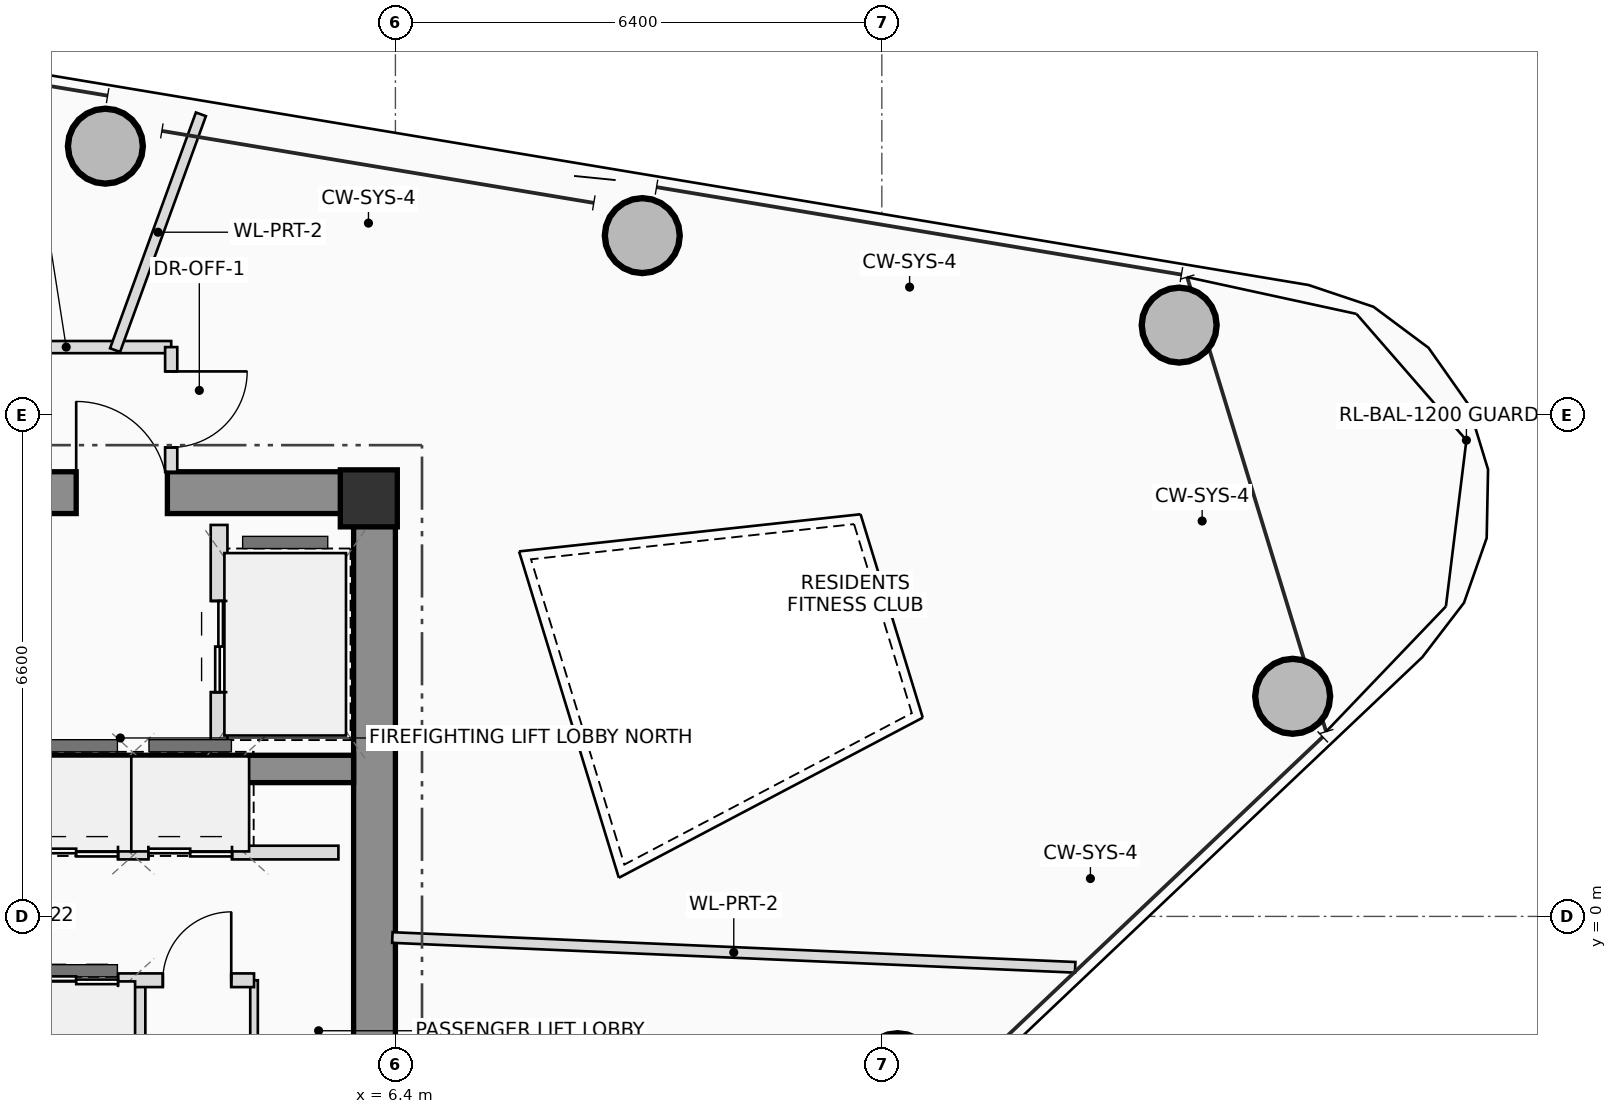
"""IFC4 building model, lengths in metres.
Left out: names, types, materials, properties, quantities, classifications, styles, units other than length and angle.
Written with IfcOpenShell. Run it as: python <this file> out.ifc"""

import sys

from ifc_helpers import new_model, si_unit, direction, frame, frame_2d, origin, origin_2d, place, context, subcontext, project, spatial, rectangle, hollow_circle, extrude, source, transform, mapped, element, fill, save


model = new_model("IFC4")
c1 = context("Model", 3, precision=1e-05, world=origin(), true_north=direction((0.0, 1.0)))
c2 = subcontext(c1, "Body", "Model", "MODEL_VIEW")
j1 = project(units=[si_unit("LENGTHUNIT", "METRE"), si_unit("PLANEANGLEUNIT", "RADIAN")], contexts=[c1])
p1 = place(None, origin())
s1 = spatial("IfcSite", under=j1, at=p1, CompositionType="ELEMENT")
p2 = place(p1, origin())
s2 = spatial("IfcBuilding", under=s1, at=p2, CompositionType="ELEMENT")
p3 = place(p2, frame((0.0, 0.0, 232.05)))
s3 = spatial("IfcBuildingStorey", under=s2, at=p3, CompositionType="ELEMENT", Elevation=232.05)
m1 = source(origin(), c2, "Body", "SweptSolid", [
    extrude(rectangle(XDim=0.75, YDim=0.75, at=origin_2d()), origin(), (0.0, 0.0, 1.0), 3.4),
])
p4 = place(p3, frame((6.05, 5.5, 0.0), z_axis=(0.0, 0.0, 1.0), x_axis=(1.0, 0.0, 0.0)))
e1 = element("IfcColumn", 1, at=p4, inside=s3, PredefinedType="COLUMN", context=c2, shape_type="MappedRepresentation", body=[
    mapped(m1, transform((0.0, 0.0, 0.0), scale=1.0)),
])
p5 = place(p3, frame((-6.4, 5.575, 0.0), z_axis=(0.0, 0.0, 1.0), x_axis=(1.0, 0.0, 0.0)))
e2 = element("IfcWall", 2, at=p5, inside=s3, PredefinedType="SHEAR", context=c2, shape_type="SweptSolid", body=[
    extrude(rectangle(XDim=12.8, YDim=0.55, at=frame_2d((6.4, 0.0))), origin(), (0.0, 0.0, 1.0), 3.4),
])
p6 = place(p5, frame((8.6, 0.0, 0.0)))
e3 = element("IfcOpeningElement", 3, at=p6, cuts=e2, PredefinedType="OPENING", context=c2, shape_type="SweptSolid", body=[
    extrude(rectangle(XDim=1.2, YDim=2.2, at=frame_2d((0.6, 1.1))), frame((0.0, 0.285, 0.0), z_axis=(0.0, -1.0, 0.0), x_axis=(1.0, 0.0, 0.0)), (0.0, 0.0, 1.0), 0.57),
])
p7 = place(p3, frame((6.125, -5.3, 0.0), z_axis=(0.0, 0.0, 1.0), x_axis=(0.0, 1.0, 0.0)))
e4 = element("IfcWall", 4, at=p7, inside=s3, PredefinedType="SHEAR", context=c2, shape_type="SweptSolid", body=[
    extrude(rectangle(XDim=10.6, YDim=0.55, at=frame_2d((5.3, 0.0))), origin(), (0.0, 0.0, 1.0), 3.4),
])
p8 = place(p3, frame((-5.85, 1.94, 0.0), z_axis=(0.0, 0.0, 1.0), x_axis=(1.0, 0.0, 0.0)))
e5 = element("IfcWall", 5, at=p8, inside=s3, PredefinedType="SHEAR", context=c2, shape_type="SweptSolid", body=[
    extrude(rectangle(XDim=11.7, YDim=0.36, at=frame_2d((5.85, 0.0))), origin(), (0.0, 0.0, 1.0), 3.4),
])
m2 = source(origin(), c2, "Body", "SweptSolid", [
    extrude(hollow_circle(Radius=0.5, WallThickness=0.04, at=origin_2d()), origin(), (0.0, 0.0, 1.0), 3.4),
])
for number, where, z_axis, x_axis in (
    (6, (13.007, -2.03, 0.0), (0.0, 0.0, 1.0), (1.0, 0.0, 0.0)),
    (7, (18.205, 2.896, 0.0), (0.0, 0.0, 1.0), (1.0, 0.0, 0.0)),
    (8, (16.712, 7.779, 0.0), (0.0, 0.0, 1.0), (1.0, 0.0, 0.0)),
    (9, (9.648, 8.957, 0.0), (0.0, 0.0, 1.0), (1.0, 0.0, 0.0)),
    (10, (2.584, 10.134, 0.0), (0.0, 0.0, 1.0), (1.0, 0.0, 0.0)),
):
    element("IfcColumn", number, at=place(p3, frame(where, z_axis=z_axis, x_axis=x_axis)), inside=s3, PredefinedType="COLUMN", context=c2, shape_type="MappedRepresentation", body=[
        mapped(m2, transform((0.0, 0.0, 0.0), scale=1.0)),
    ])
p9 = place(p3, frame((4.08, 2.2, 0.0), z_axis=(0.0, 0.0, 1.0), x_axis=(0.0, 1.0, 0.0)))
e11 = element("IfcWall", 11, at=p9, inside=s3, PredefinedType="PLUMBINGWALL", context=c2, shape_type="SweptSolid", body=[
    extrude(rectangle(XDim=2.95, YDim=0.22, at=frame_2d((1.475, 0.0))), origin(), (0.0, 0.0, 1.0), 3.2),
])
p10 = place(p9, frame((0.75, 0.0, 0.0)))
e12 = element("IfcOpeningElement", 12, at=p10, cuts=e11, PredefinedType="OPENING", context=c2, shape_type="SweptSolid", body=[
    extrude(rectangle(XDim=1.2, YDim=2.25, at=frame_2d((0.6, 1.125))), frame((0.0, 0.12, 0.0), z_axis=(0.0, -1.0, 0.0), x_axis=(1.0, 0.0, 0.0)), (0.0, 0.0, 1.0), 0.24),
])
for number, where, z_axis, x_axis in (
    (13, (3.02, 0.84, 0.0), (0.0, 0.0, 1.0), (0.0, 1.0, 0.0)),
    (14, (4.38, 0.84, 0.0), (0.0, 0.0, 1.0), (0.0, 1.0, 0.0)),
    (15, (3.02, -1.82, 0.0), (0.0, 0.0, 1.0), (0.0, 1.0, 0.0)),
):
    element("IfcWall", number, at=place(p3, frame(where, z_axis=z_axis, x_axis=x_axis)), inside=s3, PredefinedType="PLUMBINGWALL", context=c2, shape_type="SweptSolid", body=[
        extrude(rectangle(XDim=0.98, YDim=0.18, at=frame_2d((0.49, 0.0))), origin(), (0.0, 0.0, 1.0), 3.2),
    ])
p11 = place(p3, frame((4.54, -1.82, 0.0), z_axis=(0.0, 0.0, 1.0), x_axis=(0.0, 1.0, 0.0)))
e16 = element("IfcWall", 16, at=p11, inside=s3, PredefinedType="PARTITIONING", context=c2, shape_type="SweptSolid", body=[
    extrude(rectangle(XDim=0.98, YDim=0.1, at=frame_2d((0.49, 0.0))), origin(), (0.0, 0.0, 1.0), 3.2),
])
p12 = place(p3, frame((-5.68, 0.84, 0.0), z_axis=(0.0, 0.0, 1.0), x_axis=(1.0, 0.0, 0.0)))
e17 = element("IfcWall", 17, at=p12, inside=s3, PredefinedType="PLUMBINGWALL", context=c2, shape_type="SweptSolid", body=[
    extrude(rectangle(XDim=11.33, YDim=0.18, at=frame_2d((5.665, 0.0))), origin(), (0.0, 0.0, 1.0), 3.2),
])
p13 = place(p12, frame((3.13, 0.0, 0.0)))
e18 = element("IfcOpeningElement", 18, at=p13, cuts=e17, PredefinedType="OPENING", context=c2, shape_type="SweptSolid", body=[
    extrude(rectangle(XDim=0.9, YDim=2.05, at=frame_2d((0.45, 1.025))), frame((0.0, 0.1, 0.0), z_axis=(0.0, -1.0, 0.0), x_axis=(1.0, 0.0, 0.0)), (0.0, 0.0, 1.0), 0.2),
])
p14 = place(p12, frame((7.33, 0.0, 0.0)))
e19 = element("IfcOpeningElement", 19, at=p14, cuts=e17, PredefinedType="OPENING", context=c2, shape_type="SweptSolid", body=[
    extrude(rectangle(XDim=1.1, YDim=2.2, at=frame_2d((0.55, 1.1))), frame((0.0, 0.1, 0.0), z_axis=(0.0, -1.0, 0.0), x_axis=(1.0, 0.0, 0.0)), (0.0, 0.0, 1.0), 0.2),
])
p15 = place(p12, frame((8.83, 0.0, 0.0)))
e20 = element("IfcOpeningElement", 20, at=p15, cuts=e17, PredefinedType="OPENING", context=c2, shape_type="SweptSolid", body=[
    extrude(rectangle(XDim=1.1, YDim=2.2, at=frame_2d((0.55, 1.1))), frame((0.0, 0.1, 0.0), z_axis=(0.0, -1.0, 0.0), x_axis=(1.0, 0.0, 0.0)), (0.0, 0.0, 1.0), 0.2),
])
p16 = place(p3, frame((-5.68, -0.84, 0.0), z_axis=(0.0, 0.0, 1.0), x_axis=(1.0, 0.0, 0.0)))
e21 = element("IfcWall", 21, at=p16, inside=s3, PredefinedType="PLUMBINGWALL", context=c2, shape_type="SweptSolid", body=[
    extrude(rectangle(XDim=10.22, YDim=0.18, at=frame_2d((5.11, 0.0))), origin(), (0.0, 0.0, 1.0), 3.2),
])
p17 = place(p16, frame((1.88, 0.0, 0.0)))
e22 = element("IfcOpeningElement", 22, at=p17, cuts=e21, PredefinedType="OPENING", context=c2, shape_type="SweptSolid", body=[
    extrude(rectangle(XDim=0.9, YDim=2.05, at=frame_2d((0.45, 1.025))), frame((0.0, 0.1, 0.0), z_axis=(0.0, -1.0, 0.0), x_axis=(1.0, 0.0, 0.0)), (0.0, 0.0, 1.0), 0.2),
])
p18 = place(p16, frame((5.35, 0.0, 0.0)))
e23 = element("IfcOpeningElement", 23, at=p18, cuts=e21, PredefinedType="OPENING", context=c2, shape_type="SweptSolid", body=[
    extrude(rectangle(XDim=0.9, YDim=2.05, at=frame_2d((0.45, 1.025))), frame((0.0, 0.1, 0.0), z_axis=(0.0, -1.0, 0.0), x_axis=(1.0, 0.0, 0.0)), (0.0, 0.0, 1.0), 0.2),
])
p19 = place(p16, frame((7.33, 0.0, 0.0)))
e24 = element("IfcOpeningElement", 24, at=p19, cuts=e21, PredefinedType="OPENING", context=c2, shape_type="SweptSolid", body=[
    extrude(rectangle(XDim=1.1, YDim=2.2, at=frame_2d((0.55, 1.1))), frame((0.0, 0.1, 0.0), z_axis=(0.0, -1.0, 0.0), x_axis=(1.0, 0.0, 0.0)), (0.0, 0.0, 1.0), 0.2),
])
p20 = place(p16, frame((9.02, 0.0, 0.0)))
e25 = element("IfcOpeningElement", 25, at=p20, cuts=e21, PredefinedType="OPENING", context=c2, shape_type="SweptSolid", body=[
    extrude(rectangle(XDim=0.9, YDim=2.05, at=frame_2d((0.45, 1.025))), frame((0.0, 0.1, 0.0), z_axis=(0.0, -1.0, 0.0), x_axis=(1.0, 0.0, 0.0)), (0.0, 0.0, 1.0), 0.2),
])
p21 = place(p3, frame((-6.36, 7.49, 0.0), z_axis=(0.0, 0.0, 1.0), x_axis=(1.0, 0.0, 0.0)))
e26 = element("IfcWall", 26, at=p21, inside=s3, PredefinedType="PARTITIONING", context=c2, shape_type="SweptSolid", body=[
    extrude(rectangle(XDim=9.81, YDim=0.16, at=frame_2d((4.905, 0.0))), origin(), (0.0, 0.0, 1.0), 2.605),
])
p22 = place(p21, frame((1.867, 0.0, 0.0)))
e27 = element("IfcOpeningElement", 27, at=p22, cuts=e26, PredefinedType="OPENING", context=c2, shape_type="SweptSolid", body=[
    extrude(rectangle(XDim=1.0, YDim=2.25, at=frame_2d((0.5, 1.125))), frame((0.0, 0.09, 0.0), z_axis=(0.0, -1.0, 0.0), x_axis=(1.0, 0.0, 0.0)), (0.0, 0.0, 1.0), 0.18),
])
p23 = place(p21, frame((5.897, 0.0, 0.0)))
e28 = element("IfcOpeningElement", 28, at=p23, cuts=e26, PredefinedType="OPENING", context=c2, shape_type="SweptSolid", body=[
    extrude(rectangle(XDim=1.0, YDim=2.25, at=frame_2d((0.5, 1.125))), frame((0.0, 0.09, 0.0), z_axis=(0.0, -1.0, 0.0), x_axis=(1.0, 0.0, 0.0)), (0.0, 0.0, 1.0), 0.18),
])
p24 = place(p3, frame((3.45, 7.49, 0.0), z_axis=(0.0, 0.0, 1.0), x_axis=(0.0, -1.0, 0.0)))
e29 = element("IfcWall", 29, at=p24, inside=s3, PredefinedType="PARTITIONING", context=c2, shape_type="SweptSolid", body=[
    extrude(rectangle(XDim=1.64, YDim=0.16, at=frame_2d((0.82, 0.0))), origin(), (0.0, 0.0, 1.0), 3.2),
])
p25 = place(p24, frame((0.32, 0.0, 0.0)))
e30 = element("IfcOpeningElement", 30, at=p25, cuts=e29, PredefinedType="OPENING", context=c2, shape_type="SweptSolid", body=[
    extrude(rectangle(XDim=1.0, YDim=2.25, at=frame_2d((0.5, 1.125))), frame((0.0, 0.09, 0.0), z_axis=(0.0, -1.0, 0.0), x_axis=(1.0, 0.0, 0.0)), (0.0, 0.0, 1.0), 0.18),
])
p26 = place(p3, frame((6.36, -0.278, 0.0), z_axis=(0.0, 0.0, 1.0), x_axis=(0.99904773846, -0.043630451279, 0.0)))
e31 = element("IfcWall", 31, at=p26, inside=s3, PredefinedType="PARTITIONING", context=c2, shape_type="SweptSolid", body=[
    extrude(rectangle(XDim=8.992, YDim=0.14, at=frame_2d((4.496, 0.0))), origin(), (0.0, 0.0, 1.0), 2.605),
])
p27 = place(p3, frame((2.712, 7.45, 0.0), z_axis=(0.0, 0.0, 1.0), x_axis=(0.341974588874, 0.9397092, 0.0)))
e32 = element("IfcWall", 32, at=p27, inside=s3, PredefinedType="PARTITIONING", context=c2, shape_type="SweptSolid", body=[
    extrude(rectangle(XDim=3.302, YDim=0.14, at=frame_2d((1.651, 0.0))), origin(), (0.0, 0.0, 1.0), 2.605),
])
p28 = place(p6, origin())
e33 = element("IfcDoor", 33, at=p28, inside=s3, OperationType="SINGLE_SWING_LEFT", PredefinedType="DOOR", context=c2, shape_type="SweptSolid", body=[
    extrude(rectangle(XDim=1.2, YDim=2.2, at=frame_2d((0.6, 1.1))), frame((0.0, 0.025, 0.0), z_axis=(0.0, -1.0, 0.0), x_axis=(1.0, 0.0, 0.0)), (0.0, 0.0, 1.0), 0.05),
])
fill(e3, e33)
p29 = place(p10, origin())
e34 = element("IfcDoor", 34, at=p29, inside=s3, OperationType="DOUBLE_DOOR_SLIDING", PredefinedType="DOOR", context=c2, shape_type="SweptSolid", body=[
    extrude(rectangle(XDim=1.2, YDim=2.25, at=frame_2d((0.6, 1.125))), frame((0.0, 0.025, 0.0), z_axis=(0.0, -1.0, 0.0), x_axis=(1.0, 0.0, 0.0)), (0.0, 0.0, 1.0), 0.05),
])
fill(e12, e34)
p30 = place(p14, origin())
e35 = element("IfcDoor", 35, at=p30, inside=s3, OperationType="DOUBLE_DOOR_SLIDING", PredefinedType="DOOR", context=c2, shape_type="SweptSolid", body=[
    extrude(rectangle(XDim=1.1, YDim=2.2, at=frame_2d((0.55, 1.1))), frame((0.0, 0.025, 0.0), z_axis=(0.0, -1.0, 0.0), x_axis=(1.0, 0.0, 0.0)), (0.0, 0.0, 1.0), 0.05),
])
fill(e19, e35)
p31 = place(p15, origin())
e36 = element("IfcDoor", 36, at=p31, inside=s3, OperationType="DOUBLE_DOOR_SLIDING", PredefinedType="DOOR", context=c2, shape_type="SweptSolid", body=[
    extrude(rectangle(XDim=1.1, YDim=2.2, at=frame_2d((0.55, 1.1))), frame((0.0, 0.025, 0.0), z_axis=(0.0, -1.0, 0.0), x_axis=(1.0, 0.0, 0.0)), (0.0, 0.0, 1.0), 0.05),
])
fill(e20, e36)
p32 = place(p19, origin())
e37 = element("IfcDoor", 37, at=p32, inside=s3, OperationType="DOUBLE_DOOR_SLIDING", PredefinedType="DOOR", context=c2, shape_type="SweptSolid", body=[
    extrude(rectangle(XDim=1.1, YDim=2.2, at=frame_2d((0.55, 1.1))), frame((0.0, 0.025, 0.0), z_axis=(0.0, -1.0, 0.0), x_axis=(1.0, 0.0, 0.0)), (0.0, 0.0, 1.0), 0.05),
])
fill(e24, e37)
p33 = place(p20, origin())
e38 = element("IfcDoor", 38, at=p33, inside=s3, OperationType="SINGLE_SWING_RIGHT", PredefinedType="DOOR", context=c2, shape_type="SweptSolid", body=[
    extrude(rectangle(XDim=0.9, YDim=2.05, at=frame_2d((0.45, 1.025))), frame((0.0, 0.025, 0.0), z_axis=(0.0, -1.0, 0.0), x_axis=(1.0, 0.0, 0.0)), (0.0, 0.0, 1.0), 0.05),
])
fill(e25, e38)
p34 = place(p25, origin())
e39 = element("IfcDoor", 39, at=p34, inside=s3, OperationType="SINGLE_SWING_LEFT", PredefinedType="DOOR", context=c2, shape_type="SweptSolid", body=[
    extrude(rectangle(XDim=1.0, YDim=2.25, at=frame_2d((0.5, 1.125))), frame((0.0, 0.025, 0.0), z_axis=(0.0, -1.0, 0.0), x_axis=(1.0, 0.0, 0.0)), (0.0, 0.0, 1.0), 0.05),
])
fill(e30, e39)
save(model, sys.argv[1])
